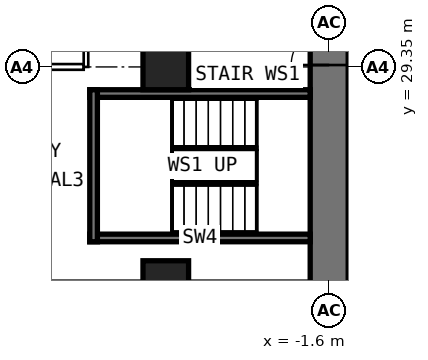
"""IFC4 building model, lengths in metres.
Left out: names, types, materials, properties, quantities, classifications, styles, units other than length and angle.
Written with IfcOpenShell. Run it as: python <this file> out.ifc"""

import sys

from ifc_helpers import new_model, si_unit, direction, frame, frame_2d, origin, origin_2d, place, context, subcontext, project, spatial, rectangle, extrude, element, fill, save


model = new_model("IFC4")
c1 = context("Model", 3, precision=1e-05, world=origin(), true_north=direction((0.0, 1.0)))
c2 = subcontext(c1, "Body", "Model", "MODEL_VIEW")
j1 = project(units=[si_unit("LENGTHUNIT", "METRE"), si_unit("PLANEANGLEUNIT", "RADIAN")], contexts=[c1])
p1 = place(None, origin())
s1 = spatial("IfcSite", under=j1, at=p1, CompositionType="ELEMENT")
p2 = place(p1, origin())
s2 = spatial("IfcBuilding", under=s1, at=p2, CompositionType="ELEMENT")
p3 = place(p2, frame((0.0, 0.0, 15.6)))
s3 = spatial("IfcBuildingStorey", under=s2, at=p3, CompositionType="ELEMENT", Elevation=15.6)
for number, where, z_axis, x_axis in (
    (1, (-5.9, 23.65, 0.0), (0.0, 0.0, 1.0), (0.0, 1.0, 0.0)),
    (2, (-5.9, 29.35, 0.0), (0.0, 0.0, 1.0), (0.0, 1.0, 0.0)),
):
    element("IfcColumn", number, at=place(p3, frame(where, z_axis=z_axis, x_axis=x_axis)), inside=s3, PredefinedType="COLUMN", context=c2, shape_type="SweptSolid", body=[
        extrude(rectangle(XDim=1.2, YDim=1.2, at=origin_2d()), origin(), (0.0, 0.0, 1.0), 4.8),
    ])
p4 = place(p3, frame((-1.6, 23.65, 0.0), z_axis=(0.0, 0.0, 1.0), x_axis=(0.0, 1.0, 0.0)))
e3 = element("IfcWall", 3, at=p4, inside=s3, PredefinedType="SHEAR", context=c2, shape_type="SweptSolid", body=[
    extrude(rectangle(XDim=10.745, YDim=1.0, at=frame_2d((5.373, 0.0))), origin(), (0.0, 0.0, 1.0), 4.8),
])
p5 = place(p4, frame((5.75, 0.0, 0.0)))
e4 = element("IfcOpeningElement", 4, at=p5, cuts=e3, PredefinedType="OPENING", context=c2, shape_type="SweptSolid", body=[
    extrude(rectangle(XDim=1.0, YDim=2.3, at=frame_2d((0.5, 1.15))), frame((0.0, 0.512, 0.0), z_axis=(0.0, -1.0, 0.0), x_axis=(1.0, 0.0, 0.0)), (0.0, 0.0, 1.0), 1.024),
])
p6 = place(p4, frame((8.86, 0.0, 0.0)))
e5 = element("IfcOpeningElement", 5, at=p6, cuts=e3, PredefinedType="OPENING", context=c2, shape_type="SweptSolid", body=[
    extrude(rectangle(XDim=1.0, YDim=2.3, at=frame_2d((0.5, 1.15))), frame((0.0, 0.512, 0.0), z_axis=(0.0, -1.0, 0.0), x_axis=(1.0, 0.0, 0.0)), (0.0, 0.0, 1.0), 1.024),
])
p7 = place(p3, frame((-8.06, 29.35, 0.0), z_axis=(0.0, 0.0, 1.0), x_axis=(-1.0, 0.0, 0.0)))
e6 = element("IfcWall", 6, at=p7, inside=s3, PredefinedType="PARTITIONING", context=c2, shape_type="SweptSolid", body=[
    extrude(rectangle(XDim=2.64, YDim=0.15, at=frame_2d((1.32, 0.0))), origin(), (0.0, 0.0, 1.0), 3.5),
])
p8 = place(p3, frame((-8.0, 29.35, 0.0), z_axis=(0.0, 0.0, 1.0), x_axis=(0.0, 1.0, 0.0)))
e7 = element("IfcWall", 7, at=p8, inside=s3, PredefinedType="PARTITIONING", context=c2, shape_type="SweptSolid", body=[
    extrude(rectangle(XDim=2.1, YDim=0.12, at=frame_2d((1.05, 0.0))), origin(), (0.0, 0.0, 1.0), 4.5),
])
for number, where, z_axis, x_axis in (
    (8, (-2.1, 24.85, 0.0), (0.0, 0.0, 1.0), (-1.0, 0.0, 0.0)),
    (9, (-2.1, 28.65, 0.0), (0.0, 0.0, 1.0), (-1.0, 0.0, 0.0)),
):
    element("IfcWall", number, at=place(p3, frame(where, z_axis=z_axis, x_axis=x_axis)), inside=s3, PredefinedType="SHEAR", context=c2, shape_type="SweptSolid", body=[
        extrude(rectangle(XDim=5.8, YDim=0.2, at=frame_2d((2.9, 0.0))), origin(), (0.0, 0.0, 1.0), 4.48),
    ])
p9 = place(p3, frame((-7.8, 24.75, 0.0), z_axis=(0.0, 0.0, 1.0), x_axis=(0.0, 1.0, 0.0)))
e10 = element("IfcWall", 10, at=p9, inside=s3, PredefinedType="SHEAR", context=c2, shape_type="SweptSolid", body=[
    extrude(rectangle(XDim=4.0, YDim=0.2, at=frame_2d((2.0, 0.0))), origin(), (0.0, 0.0, 1.0), 4.48),
])
p10 = place(p5, origin())
e11 = element("IfcDoor", 11, at=p10, inside=s3, OperationType="SINGLE_SWING_LEFT", PredefinedType="DOOR", context=c2, shape_type="SweptSolid", body=[
    extrude(rectangle(XDim=1.0, YDim=2.3, at=frame_2d((0.5, 1.15))), frame((0.0, 0.25, 0.0), z_axis=(0.0, -1.0, 0.0), x_axis=(1.0, 0.0, 0.0)), (0.0, 0.0, 1.0), 0.5),
])
fill(e4, e11)
save(model, sys.argv[1])
